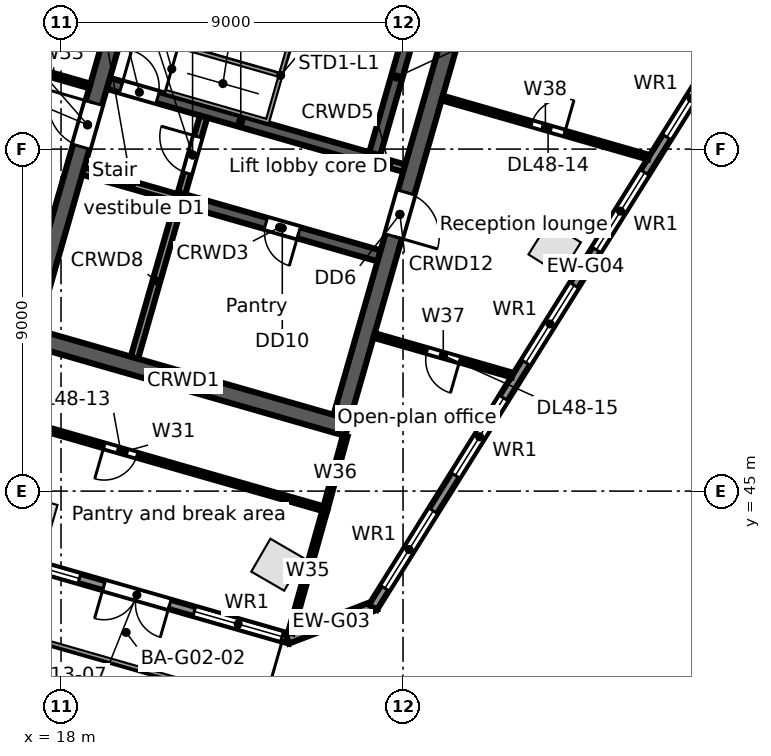
"""IFC4 building model, lengths in metres.
Left out: names, types, materials, properties, quantities, classifications, styles, units other than length and angle.
Written with IfcOpenShell. Run it as: python <this file> out.ifc"""

import sys

from ifc_helpers import new_model, si_unit, direction, frame, frame_2d, origin, origin_2d, place, context, subcontext, project, spatial, rectangle, extrude, element, fill, save


model = new_model("IFC4")
c1 = context("Model", 3, precision=1e-05, world=origin(), true_north=direction((0.0, 1.0)))
c2 = subcontext(c1, "Body", "Model", "MODEL_VIEW")
j1 = project(units=[si_unit("LENGTHUNIT", "METRE"), si_unit("PLANEANGLEUNIT", "RADIAN")], contexts=[c1])
p1 = place(None, origin())
s1 = spatial("IfcSite", under=j1, at=p1, CompositionType="ELEMENT")
p2 = place(p1, origin())
s2 = spatial("IfcBuilding", under=s1, at=p2, CompositionType="ELEMENT")
p3 = place(p2, frame((0.0, 0.0, 219.2)))
s3 = spatial("IfcBuildingStorey", under=s2, at=p3, CompositionType="ELEMENT", Elevation=219.2)
for number, where, z_axis, x_axis in (
    (1, (17.288, 44.291, 0.0), (0.0, 0.0, 1.0), (0.961, -0.276, 0.0)),
    (2, (23.69, 43.063, 0.0), (0.0, 0.0, 1.0), (-0.865, 0.501, 0.0)),
    (3, (30.99, 51.386, 0.0), (0.0, 0.0, 1.0), (0.53, 0.848, 0.0)),
):
    element("IfcColumn", number, at=place(p3, frame(where, z_axis=z_axis, x_axis=x_axis)), inside=s3, PredefinedType="COLUMN", context=c2, shape_type="SweptSolid", body=[
        extrude(rectangle(XDim=1.0, YDim=1.0, at=origin_2d()), origin(), (0.0, 0.0, 1.0), 3.9),
    ])
p4 = place(p3, frame((24.034, 41.108, 0.0), z_axis=(0.0, 0.0, 1.0), x_axis=(-0.96126060691, 0.275641153683, 0.0)))
e4 = element("IfcWall", 4, at=p4, inside=s3, PredefinedType="STANDARD", context=c2, shape_type="SweptSolid", body=[
    extrude(rectangle(XDim=24.951, YDim=0.25, at=frame_2d((12.475, 0.0))), origin(), (0.0, 0.0, 1.0), 3.62),
])
p5 = place(p4, frame((22.416, 0.0, 0.8)))
e5 = element("IfcOpeningElement", 5, at=p5, cuts=e4, PredefinedType="OPENING", context=c2, shape_type="SweptSolid", body=[
    extrude(rectangle(XDim=2.4, YDim=2.2, at=frame_2d((1.2, 1.1))), frame((0.0, 0.135, 0.0), z_axis=(0.0, -1.0, 0.0), x_axis=(1.0, 0.0, 0.0)), (0.0, 0.0, 1.0), 0.27),
])
p6 = place(p4, frame((19.643, 0.0, 0.8)))
e6 = element("IfcOpeningElement", 6, at=p6, cuts=e4, PredefinedType="OPENING", context=c2, shape_type="SweptSolid", body=[
    extrude(rectangle(XDim=2.4, YDim=2.2, at=frame_2d((1.2, 1.1))), frame((0.0, 0.135, 0.0), z_axis=(0.0, -1.0, 0.0), x_axis=(1.0, 0.0, 0.0)), (0.0, 0.0, 1.0), 0.27),
])
p7 = place(p4, frame((16.869, 0.0, 0.8)))
e7 = element("IfcOpeningElement", 7, at=p7, cuts=e4, PredefinedType="OPENING", context=c2, shape_type="SweptSolid", body=[
    extrude(rectangle(XDim=2.4, YDim=2.2, at=frame_2d((1.2, 1.1))), frame((0.0, 0.135, 0.0), z_axis=(0.0, -1.0, 0.0), x_axis=(1.0, 0.0, 0.0)), (0.0, 0.0, 1.0), 0.27),
])
p8 = place(p4, frame((14.096, 0.0, 0.8)))
e8 = element("IfcOpeningElement", 8, at=p8, cuts=e4, PredefinedType="OPENING", context=c2, shape_type="SweptSolid", body=[
    extrude(rectangle(XDim=2.4, YDim=2.2, at=frame_2d((1.2, 1.1))), frame((0.0, 0.135, 0.0), z_axis=(0.0, -1.0, 0.0), x_axis=(1.0, 0.0, 0.0)), (0.0, 0.0, 1.0), 0.27),
])
p9 = place(p4, frame((11.622, 0.0, 0.0)))
e9 = element("IfcOpeningElement", 9, at=p9, cuts=e4, PredefinedType="OPENING", context=c2, shape_type="SweptSolid", body=[
    extrude(rectangle(XDim=1.8, YDim=2.4, at=frame_2d((0.9, 1.2))), frame((0.0, 0.135, 0.0), z_axis=(0.0, -1.0, 0.0), x_axis=(1.0, 0.0, 0.0)), (0.0, 0.0, 1.0), 0.27),
])
p10 = place(p4, frame((8.549, 0.0, 0.8)))
e10 = element("IfcOpeningElement", 10, at=p10, cuts=e4, PredefinedType="OPENING", context=c2, shape_type="SweptSolid", body=[
    extrude(rectangle(XDim=2.4, YDim=2.2, at=frame_2d((1.2, 1.1))), frame((0.0, 0.135, 0.0), z_axis=(0.0, -1.0, 0.0), x_axis=(1.0, 0.0, 0.0)), (0.0, 0.0, 1.0), 0.27),
])
p11 = place(p4, frame((5.775, 0.0, 0.8)))
e11 = element("IfcOpeningElement", 11, at=p11, cuts=e4, PredefinedType="OPENING", context=c2, shape_type="SweptSolid", body=[
    extrude(rectangle(XDim=2.4, YDim=2.2, at=frame_2d((1.2, 1.1))), frame((0.0, 0.135, 0.0), z_axis=(0.0, -1.0, 0.0), x_axis=(1.0, 0.0, 0.0)), (0.0, 0.0, 1.0), 0.27),
])
p12 = place(p4, frame((3.302, 0.0, 0.0)))
e12 = element("IfcOpeningElement", 12, at=p12, cuts=e4, PredefinedType="OPENING", context=c2, shape_type="SweptSolid", body=[
    extrude(rectangle(XDim=1.8, YDim=2.4, at=frame_2d((0.9, 1.2))), frame((0.0, 0.135, 0.0), z_axis=(0.0, -1.0, 0.0), x_axis=(1.0, 0.0, 0.0)), (0.0, 0.0, 1.0), 0.27),
])
p13 = place(p4, frame((0.229, 0.0, 0.8)))
e13 = element("IfcOpeningElement", 13, at=p13, cuts=e4, PredefinedType="OPENING", context=c2, shape_type="SweptSolid", body=[
    extrude(rectangle(XDim=2.4, YDim=2.2, at=frame_2d((1.2, 1.1))), frame((0.0, 0.135, 0.0), z_axis=(0.0, -1.0, 0.0), x_axis=(1.0, 0.0, 0.0)), (0.0, 0.0, 1.0), 0.27),
])
p14 = place(p3, frame((26.27, 41.993, 0.0), z_axis=(0.0, 0.0, 1.0), x_axis=(-0.933573798066, -0.358385216722, 0.0)))
e14 = element("IfcWall", 14, at=p14, inside=s3, PredefinedType="STANDARD", context=c2, shape_type="SweptSolid", body=[
    extrude(rectangle(XDim=2.48, YDim=0.25, at=frame_2d((1.24, 0.0))), origin(), (0.0, 0.0, 1.0), 3.62),
])
p15 = place(p3, frame((37.392, 59.84, 0.0), z_axis=(0.0, 0.0, 1.0), x_axis=(-0.529919909431, -0.848047692992, 0.0)))
e15 = element("IfcWall", 15, at=p15, inside=s3, PredefinedType="STANDARD", context=c2, shape_type="SweptSolid", body=[
    extrude(rectangle(XDim=21.104, YDim=0.25, at=frame_2d((10.552, 0.0))), origin(), (0.0, 0.0, 1.0), 3.62),
])
p16 = place(p15, frame((18.112, 0.0, 0.8)))
e16 = element("IfcOpeningElement", 16, at=p16, cuts=e15, PredefinedType="OPENING", context=c2, shape_type="SweptSolid", body=[
    extrude(rectangle(XDim=2.4, YDim=2.2, at=frame_2d((1.2, 1.1))), frame((0.0, 0.135, 0.0), z_axis=(0.0, -1.0, 0.0), x_axis=(1.0, 0.0, 0.0)), (0.0, 0.0, 1.0), 0.27),
])
p17 = place(p15, frame((14.612, 0.0, 0.8)))
e17 = element("IfcOpeningElement", 17, at=p17, cuts=e15, PredefinedType="OPENING", context=c2, shape_type="SweptSolid", body=[
    extrude(rectangle(XDim=2.4, YDim=2.2, at=frame_2d((1.2, 1.1))), frame((0.0, 0.135, 0.0), z_axis=(0.0, -1.0, 0.0), x_axis=(1.0, 0.0, 0.0)), (0.0, 0.0, 1.0), 0.27),
])
p18 = place(p15, frame((11.112, 0.0, 0.8)))
e18 = element("IfcOpeningElement", 18, at=p18, cuts=e15, PredefinedType="OPENING", context=c2, shape_type="SweptSolid", body=[
    extrude(rectangle(XDim=2.4, YDim=2.2, at=frame_2d((1.2, 1.1))), frame((0.0, 0.135, 0.0), z_axis=(0.0, -1.0, 0.0), x_axis=(1.0, 0.0, 0.0)), (0.0, 0.0, 1.0), 0.27),
])
p19 = place(p15, frame((7.612, 0.0, 0.8)))
e19 = element("IfcOpeningElement", 19, at=p19, cuts=e15, PredefinedType="OPENING", context=c2, shape_type="SweptSolid", body=[
    extrude(rectangle(XDim=2.4, YDim=2.2, at=frame_2d((1.2, 1.1))), frame((0.0, 0.135, 0.0), z_axis=(0.0, -1.0, 0.0), x_axis=(1.0, 0.0, 0.0)), (0.0, 0.0, 1.0), 0.27),
])
p20 = place(p15, frame((4.112, 0.0, 0.8)))
e20 = element("IfcOpeningElement", 20, at=p20, cuts=e15, PredefinedType="OPENING", context=c2, shape_type="SweptSolid", body=[
    extrude(rectangle(XDim=2.4, YDim=2.2, at=frame_2d((1.2, 1.1))), frame((0.0, 0.135, 0.0), z_axis=(0.0, -1.0, 0.0), x_axis=(1.0, 0.0, 0.0)), (0.0, 0.0, 1.0), 0.27),
])
p21 = place(p15, frame((0.612, 0.0, 0.8)))
e21 = element("IfcOpeningElement", 21, at=p21, cuts=e15, PredefinedType="OPENING", context=c2, shape_type="SweptSolid", body=[
    extrude(rectangle(XDim=2.4, YDim=2.2, at=frame_2d((1.2, 1.1))), frame((0.0, 0.135, 0.0), z_axis=(0.0, -1.0, 0.0), x_axis=(1.0, 0.0, 0.0)), (0.0, 0.0, 1.0), 0.27),
])
p22 = place(p3, frame((16.89, 49.149, 0.0), z_axis=(0.0, 0.0, 1.0), x_axis=(0.96126248289, -0.275634611374, 0.0)))
e22 = element("IfcWall", 22, at=p22, inside=s3, PredefinedType="SOLIDWALL", context=c2, shape_type="SweptSolid", body=[
    extrude(rectangle(XDim=9.0, YDim=0.45, at=frame_2d((4.5, 0.0))), origin(), (0.0, 0.0, 1.0), 3.62),
])
p23 = place(p3, frame((18.583, 53.423, 0.0), z_axis=(0.0, 0.0, 1.0), x_axis=(0.961259287968, -0.275645753268, 0.0)))
e23 = element("IfcWall", 23, at=p23, inside=s3, PredefinedType="SOLIDWALL", context=c2, shape_type="SweptSolid", body=[
    extrude(rectangle(XDim=2.65, YDim=0.2, at=frame_2d((1.325, 0.0))), origin(), (0.0, 0.0, 1.0), 3.62),
])
p24 = place(p3, frame((21.131, 52.692, 0.0), z_axis=(0.0, 0.0, 1.0), x_axis=(0.961261488075, -0.275638080722, 0.0)))
e24 = element("IfcWall", 24, at=p24, inside=s3, PredefinedType="SOLIDWALL", context=c2, shape_type="SweptSolid", body=[
    extrude(rectangle(XDim=5.45, YDim=0.3, at=frame_2d((2.725, 0.0))), origin(), (0.0, 0.0, 1.0), 3.62),
])
p25 = place(p24, frame((2.35, 0.0, 0.0)))
e25 = element("IfcOpeningElement", 25, at=p25, cuts=e24, PredefinedType="OPENING", context=c2, shape_type="SweptSolid", body=[
    extrude(rectangle(XDim=0.9, YDim=2.1, at=frame_2d((0.45, 1.05))), frame((0.0, 0.16, 0.0), z_axis=(0.0, -1.0, 0.0), x_axis=(1.0, 0.0, 0.0)), (0.0, 0.0, 1.0), 0.32),
])
p26 = place(p3, frame((19.245, 55.73, 0.0), z_axis=(0.0, 0.0, 1.0), x_axis=(0.961263007877, -0.275632780503, 0.0)))
e26 = element("IfcWall", 26, at=p26, inside=s3, PredefinedType="SOLIDWALL", context=c2, shape_type="SweptSolid", body=[
    extrude(rectangle(XDim=7.25, YDim=0.3, at=frame_2d((3.625, 0.0))), origin(), (0.0, 0.0, 1.0), 3.62),
])
p27 = place(p26, frame((0.35, 0.0, 0.0)))
e27 = element("IfcOpeningElement", 27, at=p27, cuts=e26, PredefinedType="OPENING", context=c2, shape_type="SweptSolid", body=[
    extrude(rectangle(XDim=1.0, YDim=2.1, at=frame_2d((0.5, 1.05))), frame((0.0, 0.16, 0.0), z_axis=(0.0, -1.0, 0.0), x_axis=(1.0, 0.0, 0.0)), (0.0, 0.0, 1.0), 0.32),
])
p28 = place(p3, frame((26.214, 53.732, 0.0), z_axis=(0.0, 0.0, 1.0), x_axis=(0.961241665642, -0.275707200184, 0.0)))
e28 = element("IfcWall", 28, at=p28, inside=s3, PredefinedType="SOLIDWALL", context=c2, shape_type="SweptSolid", body=[
    extrude(rectangle(XDim=0.85, YDim=0.2, at=frame_2d((0.425, 0.0))), origin(), (0.0, 0.0, 1.0), 3.62),
])
p29 = place(p3, frame((17.168, 49.303, 0.0), z_axis=(0.0, 0.0, 1.0), x_axis=(0.275638974822, 0.961261231695, 0.0)))
e29 = element("IfcWall", 29, at=p29, inside=s3, PredefinedType="SOLIDWALL", context=c2, shape_type="SweptSolid", body=[
    extrude(rectangle(XDim=11.1, YDim=0.45, at=frame_2d((5.55, 0.0))), origin(), (0.0, 0.0, 1.0), 3.62),
])
p30 = place(p29, frame((4.95, 0.0, 0.0)))
e30 = element("IfcOpeningElement", 30, at=p30, cuts=e29, PredefinedType="OPENING", context=c2, shape_type="SweptSolid", body=[
    extrude(rectangle(XDim=1.2, YDim=2.1, at=frame_2d((0.6, 1.05))), frame((0.0, 0.235, 0.0), z_axis=(0.0, -1.0, 0.0), x_axis=(1.0, 0.0, 0.0)), (0.0, 0.0, 1.0), 0.47),
])
p31 = place(p3, frame((19.932, 48.511, 0.0), z_axis=(0.0, 0.0, 1.0), x_axis=(0.275642273411, 0.961260285827, 0.0)))
e31 = element("IfcWall", 31, at=p31, inside=s3, PredefinedType="SOLIDWALL", context=c2, shape_type="SweptSolid", body=[
    extrude(rectangle(XDim=4.2, YDim=0.2, at=frame_2d((2.1, 0.0))), origin(), (0.0, 0.0, 1.0), 3.62),
])
p32 = place(p3, frame((21.172, 52.837, 0.0), z_axis=(0.0, 0.0, 1.0), x_axis=(0.275657676022, 0.961255868981, 0.0)))
e32 = element("IfcWall", 32, at=p32, inside=s3, PredefinedType="PARTITIONING", context=c2, shape_type="SweptSolid", body=[
    extrude(rectangle(XDim=2.1, YDim=0.2, at=frame_2d((1.05, 0.0))), origin(), (0.0, 0.0, 1.0), 3.62),
])
p33 = place(p32, frame((0.55, 0.0, 0.0)))
e33 = element("IfcOpeningElement", 33, at=p33, cuts=e32, PredefinedType="OPENING", context=c2, shape_type="SweptSolid", body=[
    extrude(rectangle(XDim=1.0, YDim=2.1, at=frame_2d((0.5, 1.05))), frame((0.0, 0.11, 0.0), z_axis=(0.0, -1.0, 0.0), x_axis=(1.0, 0.0, 0.0)), (0.0, 0.0, 1.0), 0.22),
])
p34 = place(p3, frame((26.256, 53.876, 0.0), z_axis=(0.0, 0.0, 1.0), x_axis=(0.275588560745, 0.96127568636, 0.0)))
e34 = element("IfcWall", 34, at=p34, inside=s3, PredefinedType="SOLIDWALL", context=c2, shape_type="SweptSolid", body=[
    extrude(rectangle(XDim=4.2, YDim=0.3, at=frame_2d((2.1, 0.0))), origin(), (0.0, 0.0, 1.0), 3.62),
])
p35 = place(p3, frame((25.387, 46.947, 0.0), z_axis=(0.0, 0.0, 1.0), x_axis=(0.275638974822, 0.961261231695, 0.0)))
e35 = element("IfcWall", 35, at=p35, inside=s3, PredefinedType="SOLIDWALL", context=c2, shape_type="SweptSolid", body=[
    extrude(rectangle(XDim=11.1, YDim=0.45, at=frame_2d((5.55, 0.0))), origin(), (0.0, 0.0, 1.0), 3.62),
])
p36 = place(p35, frame((4.95, 0.0, 0.0)))
e36 = element("IfcOpeningElement", 36, at=p36, cuts=e35, PredefinedType="OPENING", context=c2, shape_type="SweptSolid", body=[
    extrude(rectangle(XDim=1.2, YDim=2.1, at=frame_2d((0.6, 1.05))), frame((0.0, 0.235, 0.0), z_axis=(0.0, -1.0, 0.0), x_axis=(1.0, 0.0, 0.0)), (0.0, 0.0, 1.0), 0.47),
])
p37 = place(p3, frame((14.377, 47.555, 0.0), z_axis=(0.0, 0.0, 1.0), x_axis=(0.961263044958, -0.275632651182, 0.0)))
e37 = element("IfcWall", 37, at=p37, inside=s3, PredefinedType="PARTITIONING", context=c2, shape_type="SweptSolid", body=[
    extrude(rectangle(XDim=11.0, YDim=0.125, at=frame_2d((5.5, 0.0))), origin(), (0.0, 0.0, 1.0), 2.9),
])
p38 = place(p37, frame((4.95, 0.0, 0.0)))
e38 = element("IfcOpeningElement", 38, at=p38, cuts=e37, PredefinedType="OPENING", context=c2, shape_type="SweptSolid", body=[
    extrude(rectangle(XDim=0.9, YDim=2.1, at=frame_2d((0.45, 1.05))), frame((0.0, 0.073, 0.0), z_axis=(0.0, -1.0, 0.0), x_axis=(1.0, 0.0, 0.0)), (0.0, 0.0, 1.0), 0.145),
])
p39 = place(p3, frame((16.857, 56.206, 0.0), z_axis=(0.0, 0.0, 1.0), x_axis=(0.961383985066, -0.275210525341, 0.0)))
e39 = element("IfcWall", 39, at=p39, inside=s3, PredefinedType="PARTITIONING", context=c2, shape_type="SweptSolid", body=[
    extrude(rectangle(XDim=1.977, YDim=0.125, at=frame_2d((0.988, 0.0))), origin(), (0.0, 0.0, 1.0), 3.62),
])
p40 = place(p3, frame((24.036, 41.27, 0.0), z_axis=(0.0, 0.0, 1.0), x_axis=(0.270787421954, 0.962639170256, 0.0)))
e40 = element("IfcWall", 40, at=p40, inside=s3, PredefinedType="PARTITIONING", context=c2, shape_type="SweptSolid", body=[
    extrude(rectangle(XDim=3.379, YDim=0.125, at=frame_2d((1.689, 0.0))), origin(), (0.0, 0.0, 1.0), 2.9),
])
p41 = place(p3, frame((24.951, 44.523, 0.0), z_axis=(0.0, 0.0, 1.0), x_axis=(0.264046927145, 0.964509834198, 0.0)))
e41 = element("IfcWall", 41, at=p41, inside=s3, PredefinedType="PARTITIONING", context=c2, shape_type="SweptSolid", body=[
    extrude(rectangle(XDim=2.0, YDim=0.125, at=frame_2d((1.0, 0.0))), origin(), (0.0, 0.0, 1.0), 2.9),
])
p42 = place(p3, frame((26.237, 49.096, 0.0), z_axis=(0.0, 0.0, 1.0), x_axis=(0.961285271066, -0.275555126304, 0.0)))
e42 = element("IfcWall", 42, at=p42, inside=s3, PredefinedType="PARTITIONING", context=c2, shape_type="SweptSolid", body=[
    extrude(rectangle(XDim=3.789, YDim=0.125, at=frame_2d((1.894, 0.0))), origin(), (0.0, 0.0, 1.0), 2.9),
])
p43 = place(p42, frame((1.45, 0.0, 0.0)))
e43 = element("IfcOpeningElement", 43, at=p43, cuts=e42, PredefinedType="OPENING", context=c2, shape_type="SweptSolid", body=[
    extrude(rectangle(XDim=0.9, YDim=2.1, at=frame_2d((0.45, 1.05))), frame((0.0, 0.073, 0.0), z_axis=(0.0, -1.0, 0.0), x_axis=(1.0, 0.0, 0.0)), (0.0, 0.0, 1.0), 0.145),
])
p44 = place(p3, frame((28.029, 55.344, 0.0), z_axis=(0.0, 0.0, 1.0), x_axis=(0.961249621014, -0.275679462603, 0.0)))
e44 = element("IfcWall", 44, at=p44, inside=s3, PredefinedType="PARTITIONING", context=c2, shape_type="SweptSolid", body=[
    extrude(rectangle(XDim=5.652, YDim=0.125, at=frame_2d((2.826, 0.0))), origin(), (0.0, 0.0, 1.0), 2.988),
])
p45 = place(p44, frame((2.45, 0.0, 0.0)))
e45 = element("IfcOpeningElement", 45, at=p45, cuts=e44, PredefinedType="OPENING", context=c2, shape_type="SweptSolid", body=[
    extrude(rectangle(XDim=0.9, YDim=2.1, at=frame_2d((0.45, 1.05))), frame((0.0, 0.073, 0.0), z_axis=(0.0, -1.0, 0.0), x_axis=(1.0, 0.0, 0.0)), (0.0, 0.0, 1.0), 0.145),
])
p46 = place(p11, origin())
e46 = element("IfcWindow", 46, at=p46, inside=s3, PartitioningType="SINGLE_PANEL", PredefinedType="WINDOW", context=c2, shape_type="SweptSolid", body=[
    extrude(rectangle(XDim=2.4, YDim=2.2, at=frame_2d((1.2, 1.1))), frame((0.0, 0.03, 0.0), z_axis=(0.0, -1.0, 0.0), x_axis=(1.0, 0.0, 0.0)), (0.0, 0.0, 1.0), 0.06),
])
fill(e11, e46)
p47 = place(p12, origin())
e47 = element("IfcDoor", 47, at=p47, inside=s3, OperationType="DOUBLE_DOOR_SINGLE_SWING", PredefinedType="DOOR", context=c2, shape_type="SweptSolid", body=[
    extrude(rectangle(XDim=1.8, YDim=2.4, at=frame_2d((0.9, 1.2))), frame((0.0, 0.025, 0.0), z_axis=(0.0, -1.0, 0.0), x_axis=(1.0, 0.0, 0.0)), (0.0, 0.0, 1.0), 0.05),
])
fill(e12, e47)
p48 = place(p13, origin())
e48 = element("IfcWindow", 48, at=p48, inside=s3, PartitioningType="SINGLE_PANEL", PredefinedType="WINDOW", context=c2, shape_type="SweptSolid", body=[
    extrude(rectangle(XDim=2.4, YDim=2.2, at=frame_2d((1.2, 1.1))), frame((0.0, 0.03, 0.0), z_axis=(0.0, -1.0, 0.0), x_axis=(1.0, 0.0, 0.0)), (0.0, 0.0, 1.0), 0.06),
])
fill(e13, e48)
p49 = place(p16, origin())
e49 = element("IfcWindow", 49, at=p49, inside=s3, PartitioningType="SINGLE_PANEL", PredefinedType="WINDOW", context=c2, shape_type="SweptSolid", body=[
    extrude(rectangle(XDim=2.4, YDim=2.2, at=frame_2d((1.2, 1.1))), frame((0.0, 0.03, 0.0), z_axis=(0.0, -1.0, 0.0), x_axis=(1.0, 0.0, 0.0)), (0.0, 0.0, 1.0), 0.06),
])
fill(e16, e49)
p50 = place(p17, origin())
e50 = element("IfcWindow", 50, at=p50, inside=s3, PartitioningType="SINGLE_PANEL", PredefinedType="WINDOW", context=c2, shape_type="SweptSolid", body=[
    extrude(rectangle(XDim=2.4, YDim=2.2, at=frame_2d((1.2, 1.1))), frame((0.0, 0.03, 0.0), z_axis=(0.0, -1.0, 0.0), x_axis=(1.0, 0.0, 0.0)), (0.0, 0.0, 1.0), 0.06),
])
fill(e17, e50)
p51 = place(p18, origin())
e51 = element("IfcWindow", 51, at=p51, inside=s3, PartitioningType="SINGLE_PANEL", PredefinedType="WINDOW", context=c2, shape_type="SweptSolid", body=[
    extrude(rectangle(XDim=2.4, YDim=2.2, at=frame_2d((1.2, 1.1))), frame((0.0, 0.03, 0.0), z_axis=(0.0, -1.0, 0.0), x_axis=(1.0, 0.0, 0.0)), (0.0, 0.0, 1.0), 0.06),
])
fill(e18, e51)
p52 = place(p19, origin())
e52 = element("IfcWindow", 52, at=p52, inside=s3, PartitioningType="SINGLE_PANEL", PredefinedType="WINDOW", context=c2, shape_type="SweptSolid", body=[
    extrude(rectangle(XDim=2.4, YDim=2.2, at=frame_2d((1.2, 1.1))), frame((0.0, 0.03, 0.0), z_axis=(0.0, -1.0, 0.0), x_axis=(1.0, 0.0, 0.0)), (0.0, 0.0, 1.0), 0.06),
])
fill(e19, e52)
p53 = place(p20, origin())
e53 = element("IfcWindow", 53, at=p53, inside=s3, PartitioningType="SINGLE_PANEL", PredefinedType="WINDOW", context=c2, shape_type="SweptSolid", body=[
    extrude(rectangle(XDim=2.4, YDim=2.2, at=frame_2d((1.2, 1.1))), frame((0.0, 0.03, 0.0), z_axis=(0.0, -1.0, 0.0), x_axis=(1.0, 0.0, 0.0)), (0.0, 0.0, 1.0), 0.06),
])
fill(e20, e53)
p54 = place(p27, origin())
e54 = element("IfcDoor", 54, at=p54, inside=s3, OperationType="SINGLE_SWING_LEFT", PredefinedType="DOOR", context=c2, shape_type="SweptSolid", body=[
    extrude(rectangle(XDim=1.0, YDim=2.1, at=frame_2d((0.5, 1.05))), frame((0.0, 0.025, 0.0), z_axis=(0.0, -1.0, 0.0), x_axis=(1.0, 0.0, 0.0)), (0.0, 0.0, 1.0), 0.05),
])
fill(e27, e54)
p55 = place(p33, origin())
e55 = element("IfcDoor", 55, at=p55, inside=s3, OperationType="SINGLE_SWING_RIGHT", PredefinedType="DOOR", context=c2, shape_type="SweptSolid", body=[
    extrude(rectangle(XDim=1.0, YDim=2.1, at=frame_2d((0.5, 1.05))), frame((0.0, 0.025, 0.0), z_axis=(0.0, -1.0, 0.0), x_axis=(1.0, 0.0, 0.0)), (0.0, 0.0, 1.0), 0.05),
])
fill(e33, e55)
p56 = place(p30, origin())
e56 = element("IfcDoor", 56, at=p56, inside=s3, OperationType="SINGLE_SWING_RIGHT", PredefinedType="DOOR", context=c2, shape_type="SweptSolid", body=[
    extrude(rectangle(XDim=1.2, YDim=2.1, at=frame_2d((0.6, 1.05))), frame((0.0, 0.025, 0.0), z_axis=(0.0, -1.0, 0.0), x_axis=(1.0, 0.0, 0.0)), (0.0, 0.0, 1.0), 0.05),
])
fill(e30, e56)
p57 = place(p36, frame((1.2, 0.0, 0.0), z_axis=(0.0, 0.0, 1.0), x_axis=(-1.0, 0.0, 0.0)))
e57 = element("IfcDoor", 57, at=p57, inside=s3, OperationType="SINGLE_SWING_RIGHT", PredefinedType="DOOR", context=c2, shape_type="SweptSolid", body=[
    extrude(rectangle(XDim=1.2, YDim=2.1, at=frame_2d((0.6, 1.05))), frame((0.0, 0.025, 0.0), z_axis=(0.0, -1.0, 0.0), x_axis=(1.0, 0.0, 0.0)), (0.0, 0.0, 1.0), 0.05),
])
fill(e36, e57)
p58 = place(p25, frame((0.9, 0.0, 0.0), z_axis=(0.0, 0.0, 1.0), x_axis=(-1.0, 0.0, 0.0)))
e58 = element("IfcDoor", 58, at=p58, inside=s3, OperationType="SINGLE_SWING_LEFT", PredefinedType="DOOR", context=c2, shape_type="SweptSolid", body=[
    extrude(rectangle(XDim=0.9, YDim=2.1, at=frame_2d((0.45, 1.05))), frame((0.0, 0.025, 0.0), z_axis=(0.0, -1.0, 0.0), x_axis=(1.0, 0.0, 0.0)), (0.0, 0.0, 1.0), 0.05),
])
fill(e25, e58)
p59 = place(p38, frame((0.9, 0.0, 0.0), z_axis=(0.0, 0.0, 1.0), x_axis=(-1.0, 0.0, 0.0)))
e59 = element("IfcDoor", 59, at=p59, inside=s3, OperationType="SINGLE_SWING_RIGHT", PredefinedType="DOOR", context=c2, shape_type="SweptSolid", body=[
    extrude(rectangle(XDim=0.9, YDim=2.1, at=frame_2d((0.45, 1.05))), frame((0.0, 0.025, 0.0), z_axis=(0.0, -1.0, 0.0), x_axis=(1.0, 0.0, 0.0)), (0.0, 0.0, 1.0), 0.05),
])
fill(e38, e59)
p60 = place(p45, origin())
e60 = element("IfcDoor", 60, at=p60, inside=s3, OperationType="SINGLE_SWING_RIGHT", PredefinedType="DOOR", context=c2, shape_type="SweptSolid", body=[
    extrude(rectangle(XDim=0.9, YDim=2.1, at=frame_2d((0.45, 1.05))), frame((0.0, 0.025, 0.0), z_axis=(0.0, -1.0, 0.0), x_axis=(1.0, 0.0, 0.0)), (0.0, 0.0, 1.0), 0.05),
])
fill(e45, e60)
p61 = place(p43, frame((0.9, 0.0, 0.0), z_axis=(0.0, 0.0, 1.0), x_axis=(-1.0, 0.0, 0.0)))
e61 = element("IfcDoor", 61, at=p61, inside=s3, OperationType="SINGLE_SWING_LEFT", PredefinedType="DOOR", context=c2, shape_type="SweptSolid", body=[
    extrude(rectangle(XDim=0.9, YDim=2.1, at=frame_2d((0.45, 1.05))), frame((0.0, 0.025, 0.0), z_axis=(0.0, -1.0, 0.0), x_axis=(1.0, 0.0, 0.0)), (0.0, 0.0, 1.0), 0.05),
])
fill(e43, e61)
save(model, sys.argv[1])
